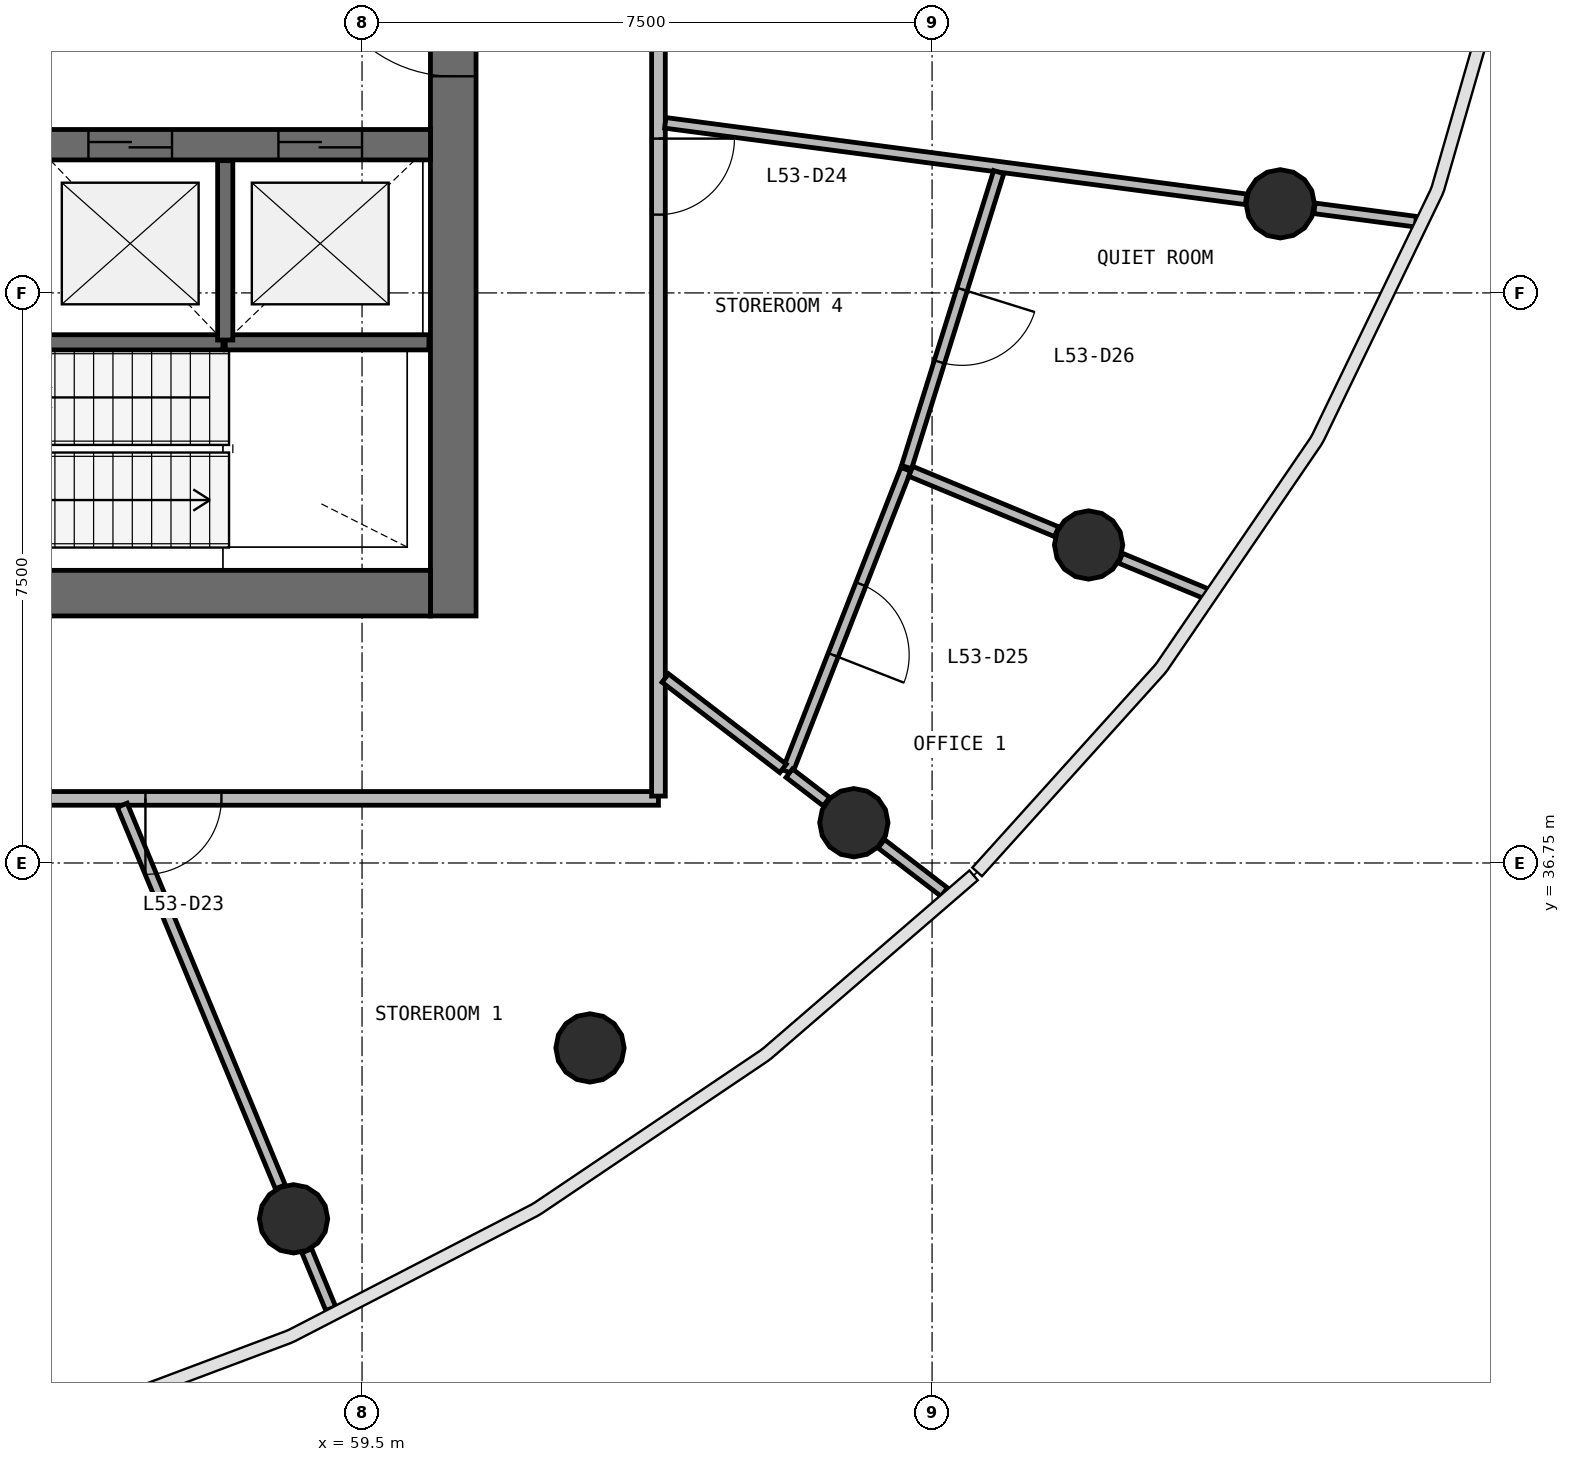
"""IFC4 building model, lengths in metres.
Left out: names, types, materials, properties, quantities, classifications, styles, units other than length and angle.
Written with IfcOpenShell. Run it as: python <this file> out.ifc"""

import sys

from ifc_helpers import new_model, si_unit, direction, frame, frame_2d, origin, origin_2d, place, context, subcontext, project, spatial, rectangle, circle, extrude, source, transform, mapped, element, fill, save


model = new_model("IFC4")
c1 = context("Model", 3, precision=1e-05, world=origin(), true_north=direction((0.0, 1.0)))
c2 = subcontext(c1, "Body", "Model", "MODEL_VIEW")
j1 = project(units=[si_unit("LENGTHUNIT", "METRE"), si_unit("PLANEANGLEUNIT", "RADIAN")], contexts=[c1])
p1 = place(None, origin())
s1 = spatial("IfcSite", under=j1, at=p1, CompositionType="ELEMENT")
p2 = place(p1, origin())
s2 = spatial("IfcBuilding", under=s1, at=p2, CompositionType="ELEMENT")
p3 = place(p2, frame((0.0, 0.0, 218.9)))
s3 = spatial("IfcBuildingStorey", under=s2, at=p3, CompositionType="ELEMENT", Elevation=218.9)
p4 = place(p3, frame((60.7, 40.0, 0.0), z_axis=(0.0, 0.0, 1.0), x_axis=(0.0, 1.0, 0.0)))
e1 = element("IfcWall", 1, at=p4, inside=s3, PredefinedType="SHEAR", context=c2, shape_type="SweptSolid", body=[
    extrude(rectangle(XDim=16.0, YDim=0.6, at=frame_2d((8.0, 0.0))), origin(), (0.0, 0.0, 1.0), 3.9),
])
p5 = place(p4, frame((7.1, 0.0, 0.0)))
e2 = element("IfcOpeningElement", 2, at=p5, cuts=e1, PredefinedType="OPENING", context=c2, shape_type="SweptSolid", body=[
    extrude(rectangle(XDim=1.8, YDim=2.1, at=frame_2d((0.9, 1.05))), frame((0.0, 0.31, 0.0), z_axis=(0.0, -1.0, 0.0), x_axis=(1.0, 0.0, 0.0)), (0.0, 0.0, 1.0), 0.62),
])
p6 = place(p3, frame((43.6, 40.3, 0.0), z_axis=(0.0, 0.0, 1.0), x_axis=(1.0, 0.0, 0.0)))
e3 = element("IfcWall", 3, at=p6, inside=s3, PredefinedType="SHEAR", context=c2, shape_type="SweptSolid", body=[
    extrude(rectangle(XDim=16.8, YDim=0.6, at=frame_2d((8.4, 0.0))), origin(), (0.0, 0.0, 1.0), 3.9),
])
p7 = place(p6, frame((10.3, 0.0, 0.0)))
e4 = element("IfcOpeningElement", 4, at=p7, cuts=e3, PredefinedType="OPENING", context=c2, shape_type="SweptSolid", body=[
    extrude(rectangle(XDim=1.2, YDim=2.1, at=frame_2d((0.6, 1.05))), frame((0.0, 0.31, 0.0), z_axis=(0.0, -1.0, 0.0), x_axis=(1.0, 0.0, 0.0)), (0.0, 0.0, 1.0), 0.62),
])
p8 = place(p6, frame((7.25, 0.0, 0.0)))
e5 = element("IfcOpeningElement", 5, at=p8, cuts=e3, PredefinedType="OPENING", context=c2, shape_type="SweptSolid", body=[
    extrude(rectangle(XDim=1.1, YDim=2.1, at=frame_2d((0.55, 1.05))), frame((0.0, 0.31, 0.0), z_axis=(0.0, -1.0, 0.0), x_axis=(1.0, 0.0, 0.0)), (0.0, 0.0, 1.0), 0.62),
])
p9 = place(p6, frame((0.7, 0.0, 0.0)))
e6 = element("IfcOpeningElement", 6, at=p9, cuts=e3, PredefinedType="OPENING", context=c2, shape_type="SweptSolid", body=[
    extrude(rectangle(XDim=0.8, YDim=2.1, at=frame_2d((0.4, 1.05))), frame((0.0, 0.31, 0.0), z_axis=(0.0, -1.0, 0.0), x_axis=(1.0, 0.0, 0.0)), (0.0, 0.0, 1.0), 0.62),
])
p10 = place(p3, frame((43.6, 46.2, 0.0), z_axis=(0.0, 0.0, 1.0), x_axis=(1.0, 0.0, 0.0)))
e7 = element("IfcWall", 7, at=p10, inside=s3, PredefinedType="SHEAR", context=c2, shape_type="SweptSolid", body=[
    extrude(rectangle(XDim=16.8, YDim=0.4, at=frame_2d((8.4, 0.0))), origin(), (0.0, 0.0, 1.0), 3.9),
])
p11 = place(p10, frame((9.8, 0.0, 0.0)))
e8 = element("IfcOpeningElement", 8, at=p11, cuts=e7, PredefinedType="OPENING", context=c2, shape_type="SweptSolid", body=[
    extrude(rectangle(XDim=1.1, YDim=2.1, at=frame_2d((0.55, 1.05))), frame((0.0, 0.21, 0.0), z_axis=(0.0, -1.0, 0.0), x_axis=(1.0, 0.0, 0.0)), (0.0, 0.0, 1.0), 0.42),
])
p12 = place(p10, frame((12.3, 0.0, 0.0)))
e9 = element("IfcOpeningElement", 9, at=p12, cuts=e7, PredefinedType="OPENING", context=c2, shape_type="SweptSolid", body=[
    extrude(rectangle(XDim=1.1, YDim=2.1, at=frame_2d((0.55, 1.05))), frame((0.0, 0.21, 0.0), z_axis=(0.0, -1.0, 0.0), x_axis=(1.0, 0.0, 0.0)), (0.0, 0.0, 1.0), 0.42),
])
p13 = place(p10, frame((14.8, 0.0, 0.0)))
e10 = element("IfcOpeningElement", 10, at=p13, cuts=e7, PredefinedType="OPENING", context=c2, shape_type="SweptSolid", body=[
    extrude(rectangle(XDim=1.1, YDim=2.1, at=frame_2d((0.55, 1.05))), frame((0.0, 0.21, 0.0), z_axis=(0.0, -1.0, 0.0), x_axis=(1.0, 0.0, 0.0)), (0.0, 0.0, 1.0), 0.42),
])
p14 = place(p10, frame((3.45, 0.0, 0.0)))
e11 = element("IfcOpeningElement", 11, at=p14, cuts=e7, PredefinedType="OPENING", context=c2, shape_type="SweptSolid", body=[
    extrude(rectangle(XDim=0.9, YDim=2.1, at=frame_2d((0.45, 1.05))), frame((0.0, 0.21, 0.0), z_axis=(0.0, -1.0, 0.0), x_axis=(1.0, 0.0, 0.0)), (0.0, 0.0, 1.0), 0.42),
])
p15 = place(p10, frame((7.85, 0.0, 0.0)))
e12 = element("IfcOpeningElement", 12, at=p15, cuts=e7, PredefinedType="OPENING", context=c2, shape_type="SweptSolid", body=[
    extrude(rectangle(XDim=0.9, YDim=2.1, at=frame_2d((0.45, 1.05))), frame((0.0, 0.21, 0.0), z_axis=(0.0, -1.0, 0.0), x_axis=(1.0, 0.0, 0.0)), (0.0, 0.0, 1.0), 0.42),
])
m1 = source(origin(), c2, "Body", "SweptSolid", [
    extrude(circle(Radius=0.45, at=origin_2d()), origin(), (0.0, 0.0, 1.0), 3.9),
])
for number, where, z_axis, x_axis in (
    (13, (58.599, 32.069, 0.0), (0.0, 0.0, 1.0), (1.0, 0.0, 0.0)),
    (14, (62.499, 34.317, 0.0), (0.0, 0.0, 1.0), (1.0, 0.0, 0.0)),
    (15, (65.971, 37.28, 0.0), (0.0, 0.0, 1.0), (1.0, 0.0, 0.0)),
    (16, (69.059, 40.934, 0.0), (0.0, 0.0, 1.0), (1.0, 0.0, 0.0)),
    (17, (71.581, 45.422, 0.0), (0.0, 0.0, 1.0), (1.0, 0.0, 0.0)),
):
    element("IfcColumn", number, at=place(p3, frame(where, z_axis=z_axis, x_axis=x_axis)), inside=s3, PredefinedType="COLUMN", context=c2, shape_type="MappedRepresentation", body=[
        mapped(m1, transform((0.0, 0.0, 0.0), scale=1.0)),
    ])
p16 = place(p3, frame((57.7, 43.6, 0.0), z_axis=(0.0, 0.0, 1.0), x_axis=(1.0, 0.0, 0.0)))
e18 = element("IfcWall", 18, at=p16, inside=s3, PredefinedType="SOLIDWALL", context=c2, shape_type="SweptSolid", body=[
    extrude(rectangle(XDim=2.68, YDim=0.2, at=frame_2d((1.34, 0.0))), origin(), (0.0, 0.0, 1.0), 3.58),
])
p17 = place(p3, frame((55.2, 43.6, 0.0), z_axis=(0.0, 0.0, 1.0), x_axis=(1.0, 0.0, 0.0)))
e19 = element("IfcWall", 19, at=p17, inside=s3, PredefinedType="SOLIDWALL", context=c2, shape_type="SweptSolid", body=[
    extrude(rectangle(XDim=2.47, YDim=0.2, at=frame_2d((1.235, 0.0))), origin(), (0.0, 0.0, 1.0), 3.58),
])
p18 = place(p3, frame((57.7, 43.63, 0.0), z_axis=(0.0, 0.0, 1.0), x_axis=(0.0, 1.0, 0.0)))
e20 = element("IfcWall", 20, at=p18, inside=s3, PredefinedType="SOLIDWALL", context=c2, shape_type="SweptSolid", body=[
    extrude(rectangle(XDim=2.36, YDim=0.2, at=frame_2d((1.18, 0.0))), origin(), (0.0, 0.0, 1.0), 3.58),
])
p19 = place(p3, frame((63.4, 37.6, 0.0), z_axis=(0.0, 0.0, 1.0), x_axis=(-1.0, 0.0, 0.0)))
e21 = element("IfcWall", 21, at=p19, inside=s3, PredefinedType="PARTITIONING", context=c2, shape_type="SweptSolid", body=[
    extrude(rectangle(XDim=22.8, YDim=0.18, at=frame_2d((11.4, 0.0))), origin(), (0.0, 0.0, 1.0), 2.88),
])
p20 = place(p19, frame((16.05, 0.0, 0.0)))
e22 = element("IfcOpeningElement", 22, at=p20, cuts=e21, PredefinedType="OPENING", context=c2, shape_type="SweptSolid", body=[
    extrude(rectangle(XDim=0.9, YDim=2.1, at=frame_2d((0.45, 1.05))), frame((0.0, 0.1, 0.0), z_axis=(0.0, -1.0, 0.0), x_axis=(1.0, 0.0, 0.0)), (0.0, 0.0, 1.0), 0.2),
])
p21 = place(p19, frame((13.05, 0.0, 0.0)))
e23 = element("IfcOpeningElement", 23, at=p21, cuts=e21, PredefinedType="OPENING", context=c2, shape_type="SweptSolid", body=[
    extrude(rectangle(XDim=0.9, YDim=2.1, at=frame_2d((0.45, 1.05))), frame((0.0, 0.1, 0.0), z_axis=(0.0, -1.0, 0.0), x_axis=(1.0, 0.0, 0.0)), (0.0, 0.0, 1.0), 0.2),
])
p22 = place(p19, frame((10.95, 0.0, 0.0)))
e24 = element("IfcOpeningElement", 24, at=p22, cuts=e21, PredefinedType="OPENING", context=c2, shape_type="SweptSolid", body=[
    extrude(rectangle(XDim=1.0, YDim=2.1, at=frame_2d((0.5, 1.05))), frame((0.0, 0.1, 0.0), z_axis=(0.0, -1.0, 0.0), x_axis=(1.0, 0.0, 0.0)), (0.0, 0.0, 1.0), 0.2),
])
p23 = place(p19, frame((5.75, 0.0, 0.0)))
e25 = element("IfcOpeningElement", 25, at=p23, cuts=e21, PredefinedType="OPENING", context=c2, shape_type="SweptSolid", body=[
    extrude(rectangle(XDim=1.0, YDim=2.1, at=frame_2d((0.5, 1.05))), frame((0.0, 0.1, 0.0), z_axis=(0.0, -1.0, 0.0), x_axis=(1.0, 0.0, 0.0)), (0.0, 0.0, 1.0), 0.2),
])
p24 = place(p3, frame((63.4, 58.37, 0.0), z_axis=(0.0, 0.0, 1.0), x_axis=(0.0, -1.0, 0.0)))
e26 = element("IfcWall", 26, at=p24, inside=s3, PredefinedType="PARTITIONING", context=c2, shape_type="SweptSolid", body=[
    extrude(rectangle(XDim=20.74, YDim=0.18, at=frame_2d((10.37, 0.0))), origin(), (0.0, 0.0, 1.0), 2.88),
])
p25 = place(p24, frame((12.09, 0.0, 0.0)))
e27 = element("IfcOpeningElement", 27, at=p25, cuts=e26, PredefinedType="OPENING", context=c2, shape_type="SweptSolid", body=[
    extrude(rectangle(XDim=1.0, YDim=2.1, at=frame_2d((0.5, 1.05))), frame((0.0, 0.1, 0.0), z_axis=(0.0, -1.0, 0.0), x_axis=(1.0, 0.0, 0.0)), (0.0, 0.0, 1.0), 0.2),
])
p26 = place(p24, frame((9.89, 0.0, 0.0)))
e28 = element("IfcOpeningElement", 28, at=p26, cuts=e26, PredefinedType="OPENING", context=c2, shape_type="SweptSolid", body=[
    extrude(rectangle(XDim=1.0, YDim=2.1, at=frame_2d((0.5, 1.05))), frame((0.0, 0.1, 0.0), z_axis=(0.0, -1.0, 0.0), x_axis=(1.0, 0.0, 0.0)), (0.0, 0.0, 1.0), 0.2),
])
p27 = place(p3, frame((71.13, 45.481, 0.0), z_axis=(0.0, 0.0, 1.0), x_axis=(-0.991445127496, 0.130524170803, 0.0)))
e29 = element("IfcWall", 29, at=p27, inside=s3, PredefinedType="PARTITIONING", context=c2, shape_type="SweptSolid", body=[
    extrude(rectangle(XDim=7.706, YDim=0.14, at=frame_2d((3.853, 0.0))), origin(), (0.0, 0.0, 1.0), 2.88),
])
p28 = place(p3, frame((56.345, 37.51, 0.0), z_axis=(0.0, 0.0, 1.0), x_axis=(0.382655972885, -0.923890906122, 0.0)))
e30 = element("IfcWall", 30, at=p28, inside=s3, PredefinedType="PARTITIONING", context=c2, shape_type="SweptSolid", body=[
    extrude(rectangle(XDim=5.435, YDim=0.14, at=frame_2d((2.717, 0.0))), origin(), (0.0, 0.0, 1.0), 2.88),
])
p29 = place(p3, frame((66.656, 41.929, 0.0), z_axis=(0.0, 0.0, 1.0), x_axis=(-0.364603977748, -0.931162681496, 0.0)))
e31 = element("IfcWall", 31, at=p29, inside=s3, PredefinedType="PARTITIONING", context=c2, shape_type="SweptSolid", body=[
    extrude(rectangle(XDim=4.273, YDim=0.14, at=frame_2d((2.137, 0.0))), origin(), (0.0, 0.0, 1.0), 2.88),
])
p30 = place(p29, frame((1.624, 0.0, 0.0)))
e32 = element("IfcOpeningElement", 32, at=p30, cuts=e31, PredefinedType="OPENING", context=c2, shape_type="SweptSolid", body=[
    extrude(rectangle(XDim=1.0, YDim=2.1, at=frame_2d((0.5, 1.05))), frame((0.0, 0.08, 0.0), z_axis=(0.0, -1.0, 0.0), x_axis=(1.0, 0.0, 0.0)), (0.0, 0.0, 1.0), 0.16),
])
p31 = place(p3, frame((67.877, 45.839, 0.0), z_axis=(0.0, 0.0, 1.0), x_axis=(-0.298230548624, -0.954493865809, 0.0)))
e33 = element("IfcWall", 33, at=p31, inside=s3, PredefinedType="PARTITIONING", context=c2, shape_type="SweptSolid", body=[
    extrude(rectangle(XDim=4.066, YDim=0.14, at=frame_2d((2.033, 0.0))), origin(), (0.0, 0.0, 1.0), 2.88),
])
p32 = place(p31, frame((1.616, 0.0, 0.0)))
e34 = element("IfcOpeningElement", 34, at=p32, cuts=e33, PredefinedType="OPENING", context=c2, shape_type="SweptSolid", body=[
    extrude(rectangle(XDim=1.0, YDim=2.1, at=frame_2d((0.5, 1.05))), frame((0.0, 0.08, 0.0), z_axis=(0.0, -1.0, 0.0), x_axis=(1.0, 0.0, 0.0)), (0.0, 0.0, 1.0), 0.16),
])
p33 = place(p3, frame((65.121, 37.932, 0.0), z_axis=(0.0, 0.0, 1.0), x_axis=(0.793300433337, -0.608830372491, 0.0)))
e35 = element("IfcWall", 35, at=p33, inside=s3, PredefinedType="PARTITIONING", context=c2, shape_type="SweptSolid", body=[
    extrude(rectangle(XDim=0.617, YDim=0.14, at=frame_2d((0.308, 0.0))), origin(), (0.0, 0.0, 1.0), 2.88),
])
p34 = place(p3, frame((63.49, 39.183, 0.0), z_axis=(0.0, 0.0, 1.0), x_axis=(0.793366886625, -0.608743774676, 0.0)))
e36 = element("IfcWall", 36, at=p34, inside=s3, PredefinedType="PARTITIONING", context=c2, shape_type="SweptSolid", body=[
    extrude(rectangle(XDim=1.953, YDim=0.14, at=frame_2d((0.977, 0.0))), origin(), (0.0, 0.0, 1.0), 2.88),
])
p35 = place(p3, frame((66.72, 41.903, 0.0), z_axis=(0.0, 0.0, 1.0), x_axis=(0.923892183292, -0.38265288925, 0.0)))
e37 = element("IfcWall", 37, at=p35, inside=s3, PredefinedType="PARTITIONING", context=c2, shape_type="SweptSolid", body=[
    extrude(rectangle(XDim=2.077, YDim=0.14, at=frame_2d((1.038, 0.0))), origin(), (0.0, 0.0, 1.0), 2.88),
])
p36 = place(p3, frame((72.031, 45.363, 0.0), z_axis=(0.0, 0.0, 1.0), x_axis=(0.991446880033, -0.130510858064, 0.0)))
e38 = element("IfcWall", 38, at=p36, inside=s3, PredefinedType="PARTITIONING", context=c2, shape_type="SweptSolid", body=[
    extrude(rectangle(XDim=1.345, YDim=0.14, at=frame_2d((0.672, 0.0))), origin(), (0.0, 0.0, 1.0), 2.88),
])
p37 = place(p3, frame((69.48, 40.76, 0.0), z_axis=(0.0, 0.0, 1.0), x_axis=(0.923929420808, -0.382562969151, 0.0)))
e39 = element("IfcWall", 39, at=p37, inside=s3, PredefinedType="PARTITIONING", context=c2, shape_type="SweptSolid", body=[
    extrude(rectangle(XDim=1.225, YDim=0.14, at=frame_2d((0.613, 0.0))), origin(), (0.0, 0.0, 1.0), 2.88),
])
p38 = place(p3, frame((67.16, 36.367, 0.0), z_axis=(0.0, 0.0, 1.0), x_axis=(-0.793388088797, 0.608716141198, 0.0)))
e40 = element("IfcWall", 40, at=p38, inside=s3, PredefinedType="PARTITIONING", context=c2, shape_type="SweptSolid", body=[
    extrude(rectangle(XDim=1.044, YDim=0.14, at=frame_2d((0.522, 0.0))), origin(), (0.0, 0.0, 1.0), 2.88),
])
p39 = place(p3, frame((58.773, 31.648, 0.0), z_axis=(0.0, 0.0, 1.0), x_axis=(0.382657203083, -0.923890396599, 0.0)))
e41 = element("IfcWall", 41, at=p39, inside=s3, PredefinedType="PARTITIONING", context=c2, shape_type="SweptSolid", body=[
    extrude(rectangle(XDim=0.824, YDim=0.14, at=frame_2d((0.412, 0.0))), origin(), (0.0, 0.0, 1.0), 2.88),
])
m2 = source(origin(), c2, "Body", "SweptSolid", [
    extrude(rectangle(XDim=1.8, YDim=2.1, at=frame_2d((0.9, 1.05))), frame((0.0, 0.025, 0.0), z_axis=(0.0, -1.0, 0.0), x_axis=(1.0, 0.0, 0.0)), (0.0, 0.0, 1.0), 0.05),
])
p40 = place(p5, origin())
e42 = element("IfcDoor", 42, at=p40, inside=s3, OperationType="SINGLE_SWING_RIGHT", PredefinedType="DOOR", context=c2, shape_type="MappedRepresentation", body=[
    mapped(m2, transform((0.0, 0.0, 0.0), scale=1.0)),
])
fill(e2, e42)
m3 = source(origin(), c2, "Body", "SweptSolid", [
    extrude(rectangle(XDim=1.1, YDim=2.1, at=frame_2d((0.55, 1.05))), frame((0.0, 0.025, 0.0), z_axis=(0.0, -1.0, 0.0), x_axis=(1.0, 0.0, 0.0)), (0.0, 0.0, 1.0), 0.05),
])
p41 = place(p12, origin())
e43 = element("IfcDoor", 43, at=p41, inside=s3, OperationType="DOUBLE_DOOR_SLIDING", PredefinedType="USERDEFINED", context=c2, shape_type="MappedRepresentation", body=[
    mapped(m3, transform((0.0, 0.0, 0.0), scale=1.0)),
])
fill(e9, e43)
p42 = place(p13, origin())
e44 = element("IfcDoor", 44, at=p42, inside=s3, OperationType="DOUBLE_DOOR_SLIDING", PredefinedType="USERDEFINED", context=c2, shape_type="MappedRepresentation", body=[
    mapped(m3, transform((0.0, 0.0, 0.0), scale=1.0)),
])
fill(e10, e44)
m4 = source(origin(), c2, "Body", "SweptSolid", [
    extrude(rectangle(XDim=1.0, YDim=2.1, at=frame_2d((0.5, 1.05))), frame((0.0, 0.025, 0.0), z_axis=(0.0, -1.0, 0.0), x_axis=(1.0, 0.0, 0.0)), (0.0, 0.0, 1.0), 0.05),
])
p43 = place(p23, origin())
e45 = element("IfcDoor", 45, at=p43, inside=s3, OperationType="SINGLE_SWING_RIGHT", PredefinedType="DOOR", context=c2, shape_type="MappedRepresentation", body=[
    mapped(m4, transform((0.0, 0.0, 0.0), scale=1.0)),
])
fill(e25, e45)
p44 = place(p25, origin())
e46 = element("IfcDoor", 46, at=p44, inside=s3, OperationType="SINGLE_SWING_LEFT", PredefinedType="DOOR", context=c2, shape_type="MappedRepresentation", body=[
    mapped(m4, transform((0.0, 0.0, 0.0), scale=1.0)),
])
fill(e27, e46)
p45 = place(p30, origin())
e47 = element("IfcDoor", 47, at=p45, inside=s3, OperationType="SINGLE_SWING_RIGHT", PredefinedType="DOOR", context=c2, shape_type="MappedRepresentation", body=[
    mapped(m4, transform((0.0, 0.0, 0.0), scale=1.0)),
])
fill(e32, e47)
p46 = place(p32, origin())
e48 = element("IfcDoor", 48, at=p46, inside=s3, OperationType="SINGLE_SWING_LEFT", PredefinedType="DOOR", context=c2, shape_type="MappedRepresentation", body=[
    mapped(m4, transform((0.0, 0.0, 0.0), scale=1.0)),
])
fill(e34, e48)
save(model, sys.argv[1])
